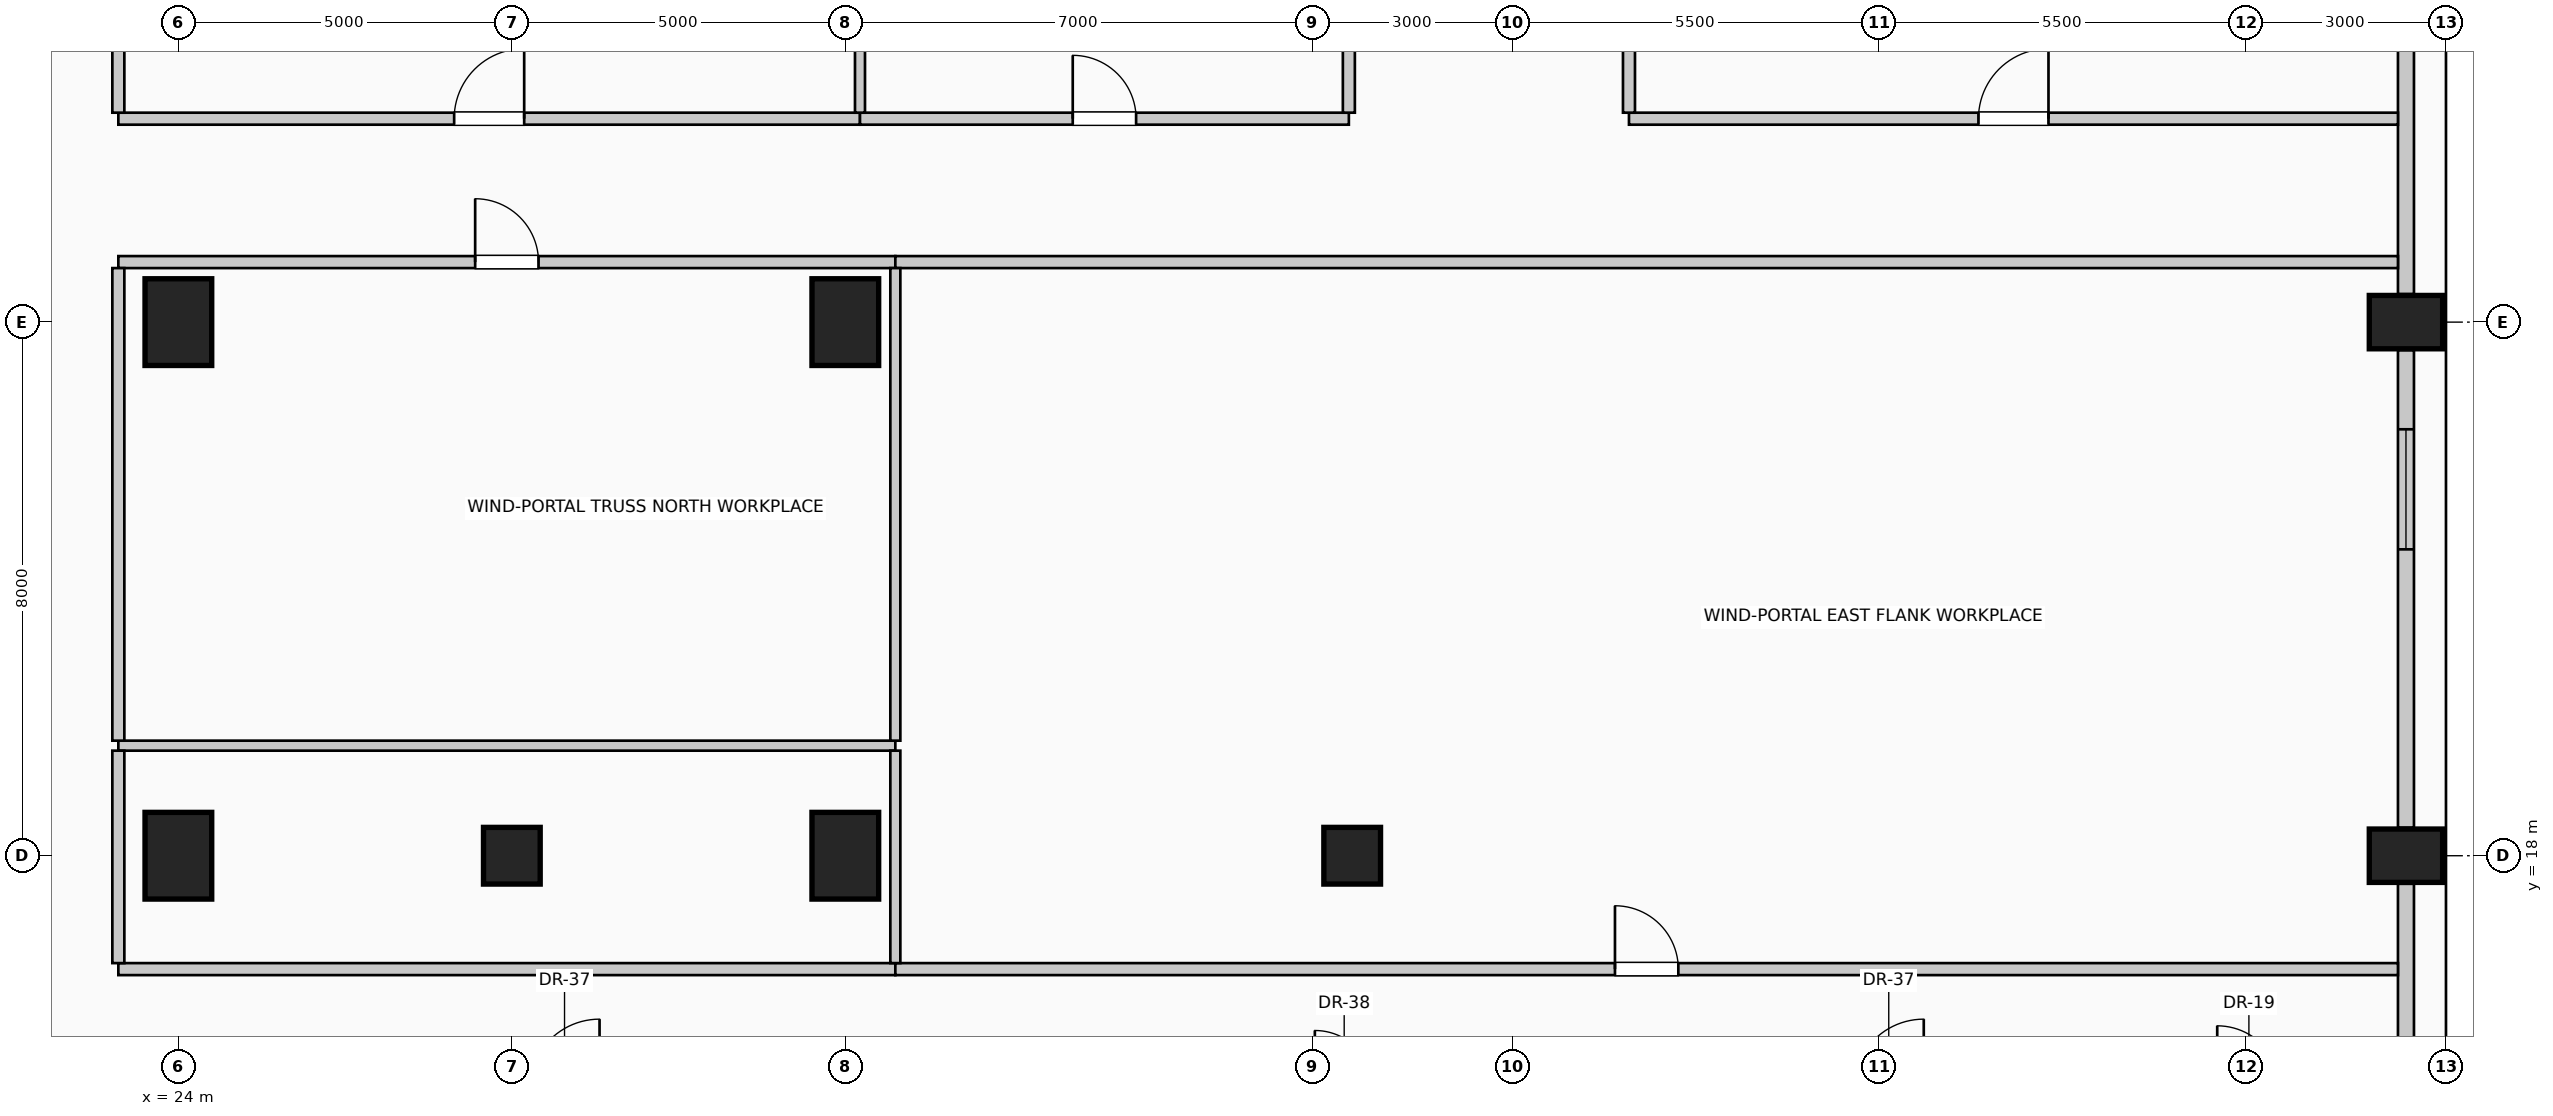
"""IFC4 building model, lengths in metres.
Left out: names, types, materials, properties, quantities, classifications, styles, units other than length and angle.
Written with IfcOpenShell. Run it as: python <this file> out.ifc"""

import sys

from ifc_helpers import new_model, si_unit, direction, frame, frame_2d, origin, origin_2d, place, context, subcontext, project, spatial, rectangle, circle, extrude, element, fill, save


model = new_model("IFC4")
c1 = context("Model", 3, precision=1e-05, world=origin(), true_north=direction((0.0, 1.0)))
c2 = subcontext(c1, "Body", "Model", "MODEL_VIEW")
j1 = project(units=[si_unit("LENGTHUNIT", "METRE"), si_unit("PLANEANGLEUNIT", "RADIAN")], contexts=[c1])
p1 = place(None, origin())
s1 = spatial("IfcSite", under=j1, at=p1, CompositionType="ELEMENT")
p2 = place(p1, origin())
s2 = spatial("IfcBuilding", under=s1, at=p2, CompositionType="ELEMENT")
p3 = place(p2, frame((0.0, 0.0, 206.6)))
s3 = spatial("IfcBuildingStorey", under=s2, at=p3, CompositionType="ELEMENT", Elevation=206.6)
for number, where, z_axis, x_axis in (
    (1, (57.4, 18.0, 0.0), (0.0, 0.0, 1.0), (0.0, 1.0, 0.0)),
    (2, (57.4, 26.0, 0.0), (0.0, 0.0, 1.0), (0.0, 1.0, 0.0)),
):
    element("IfcColumn", number, at=place(p3, frame(where, z_axis=z_axis, x_axis=x_axis)), inside=s3, PredefinedType="COLUMN", context=c2, shape_type="SweptSolid", body=[
        extrude(rectangle(XDim=0.8, YDim=1.1, at=origin_2d()), origin(), (0.0, 0.0, 1.0), 4.0),
    ])
for number, where, z_axis, x_axis in (
    (3, (24.0, 18.0, 0.0), (0.0, 0.0, 1.0), (1.0, 0.0, 0.0)),
    (4, (34.0, 18.0, 0.0), (0.0, 0.0, 1.0), (1.0, 0.0, 0.0)),
    (5, (24.0, 26.0, 0.0), (0.0, 0.0, 1.0), (1.0, 0.0, 0.0)),
    (6, (34.0, 26.0, 0.0), (0.0, 0.0, 1.0), (1.0, 0.0, 0.0)),
):
    element("IfcColumn", number, at=place(p3, frame(where, z_axis=z_axis, x_axis=x_axis)), inside=s3, PredefinedType="COLUMN", context=c2, shape_type="SweptSolid", body=[
        extrude(rectangle(XDim=1.0, YDim=1.3, at=origin_2d()), origin(), (0.0, 0.0, 1.0), 4.0),
    ])
for number, where, z_axis, x_axis in (
    (7, (29.0, 18.0, 0.0), (0.0, 0.0, 1.0), (1.0, 0.0, 0.0)),
    (8, (41.6, 18.0, 0.0), (0.0, 0.0, 1.0), (1.0, 0.0, 0.0)),
):
    element("IfcColumn", number, at=place(p3, frame(where, z_axis=z_axis, x_axis=x_axis)), inside=s3, PredefinedType="COLUMN", context=c2, shape_type="SweptSolid", body=[
        extrude(circle(Radius=0.425, at=origin_2d()), origin(), (0.0, 0.0, 1.0), 4.0),
    ])
p4 = place(p3, frame((57.4, 17.58, 0.0), z_axis=(0.0, 0.0, 1.0), x_axis=(0.0, -1.0, 0.0)))
e9 = element("IfcWall", 9, at=p4, inside=s3, PredefinedType="SOLIDWALL", context=c2, shape_type="SweptSolid", body=[
    extrude(rectangle(XDim=7.16, YDim=0.24, at=frame_2d((3.58, 0.0))), origin(), (0.0, 0.0, 1.0), 3.0),
])
p5 = place(p4, frame((4.173, 0.0, 0.42)))
e10 = element("IfcOpeningElement", 10, at=p5, cuts=e9, PredefinedType="OPENING", context=c2, shape_type="SweptSolid", body=[
    extrude(rectangle(XDim=1.8, YDim=2.2, at=frame_2d((0.9, 1.1))), frame((0.0, 0.13, 0.0), z_axis=(0.0, -1.0, 0.0), x_axis=(1.0, 0.0, 0.0)), (0.0, 0.0, 1.0), 0.26),
])
p6 = place(p3, frame((57.4, 25.58, 0.0), z_axis=(0.0, 0.0, 1.0), x_axis=(0.0, -1.0, 0.0)))
e11 = element("IfcWall", 11, at=p6, inside=s3, PredefinedType="SOLIDWALL", context=c2, shape_type="SweptSolid", body=[
    extrude(rectangle(XDim=7.16, YDim=0.24, at=frame_2d((3.58, 0.0))), origin(), (0.0, 0.0, 1.0), 3.0),
])
p7 = place(p6, frame((1.187, 0.0, 0.42)))
e12 = element("IfcOpeningElement", 12, at=p7, cuts=e11, PredefinedType="OPENING", context=c2, shape_type="SweptSolid", body=[
    extrude(rectangle(XDim=1.8, YDim=2.2, at=frame_2d((0.9, 1.1))), frame((0.0, 0.13, 0.0), z_axis=(0.0, -1.0, 0.0), x_axis=(1.0, 0.0, 0.0)), (0.0, 0.0, 1.0), 0.26),
])
p8 = place(p3, frame((57.4, 33.58, 0.0), z_axis=(0.0, 0.0, 1.0), x_axis=(0.0, -1.0, 0.0)))
e13 = element("IfcWall", 13, at=p8, inside=s3, PredefinedType="SOLIDWALL", context=c2, shape_type="SweptSolid", body=[
    extrude(rectangle(XDim=7.16, YDim=0.24, at=frame_2d((3.58, 0.0))), origin(), (0.0, 0.0, 1.0), 3.0),
])
p9 = place(p3, frame((23.1, 16.3, 0.0), z_axis=(0.0, 0.0, 1.0), x_axis=(1.0, 0.0, 0.0)))
e14 = element("IfcWall", 14, at=p9, inside=s3, PredefinedType="PARTITIONING", context=c2, shape_type="SweptSolid", body=[
    extrude(rectangle(XDim=11.65, YDim=0.18, at=frame_2d((5.825, 0.0))), origin(), (0.0, 0.0, 1.0), 3.75),
])
p10 = place(p3, frame((34.75, 16.3, 0.0), z_axis=(0.0, 0.0, 1.0), x_axis=(1.0, 0.0, 0.0)))
e15 = element("IfcWall", 15, at=p10, inside=s3, PredefinedType="PARTITIONING", context=c2, shape_type="SweptSolid", body=[
    extrude(rectangle(XDim=22.53, YDim=0.18, at=frame_2d((11.265, 0.0))), origin(), (0.0, 0.0, 1.0), 3.75),
])
p11 = place(p10, frame((10.79, 0.0, 0.0)))
e16 = element("IfcOpeningElement", 16, at=p11, cuts=e15, PredefinedType="OPENING", context=c2, shape_type="SweptSolid", body=[
    extrude(rectangle(XDim=0.95, YDim=2.15, at=frame_2d((0.475, 1.075))), frame((0.0, 0.1, 0.0), z_axis=(0.0, -1.0, 0.0), x_axis=(1.0, 0.0, 0.0)), (0.0, 0.0, 1.0), 0.2),
])
p12 = place(p3, frame((23.1, 19.65, 0.0), z_axis=(0.0, 0.0, 1.0), x_axis=(1.0, 0.0, 0.0)))
e17 = element("IfcWall", 17, at=p12, inside=s3, PredefinedType="PARTITIONING", context=c2, shape_type="SweptSolid", body=[
    extrude(rectangle(XDim=11.65, YDim=0.15, at=frame_2d((5.825, 0.0))), origin(), (0.0, 0.0, 1.0), 3.75),
])
p13 = place(p3, frame((23.1, 26.9, 0.0), z_axis=(0.0, 0.0, 1.0), x_axis=(1.0, 0.0, 0.0)))
e18 = element("IfcWall", 18, at=p13, inside=s3, PredefinedType="PARTITIONING", context=c2, shape_type="SweptSolid", body=[
    extrude(rectangle(XDim=11.65, YDim=0.18, at=frame_2d((5.825, 0.0))), origin(), (0.0, 0.0, 1.0), 3.75),
])
p14 = place(p13, frame((5.35, 0.0, 0.0)))
e19 = element("IfcOpeningElement", 19, at=p14, cuts=e18, PredefinedType="OPENING", context=c2, shape_type="SweptSolid", body=[
    extrude(rectangle(XDim=0.95, YDim=2.15, at=frame_2d((0.475, 1.075))), frame((0.0, 0.1, 0.0), z_axis=(0.0, -1.0, 0.0), x_axis=(1.0, 0.0, 0.0)), (0.0, 0.0, 1.0), 0.2),
])
p15 = place(p3, frame((34.75, 26.9, 0.0), z_axis=(0.0, 0.0, 1.0), x_axis=(1.0, 0.0, 0.0)))
e20 = element("IfcWall", 20, at=p15, inside=s3, PredefinedType="PARTITIONING", context=c2, shape_type="SweptSolid", body=[
    extrude(rectangle(XDim=22.53, YDim=0.18, at=frame_2d((11.265, 0.0))), origin(), (0.0, 0.0, 1.0), 3.75),
])
p16 = place(p3, frame((23.1, 29.05, 0.0), z_axis=(0.0, 0.0, 1.0), x_axis=(1.0, 0.0, 0.0)))
e21 = element("IfcWall", 21, at=p16, inside=s3, PredefinedType="PARTITIONING", context=c2, shape_type="SweptSolid", body=[
    extrude(rectangle(XDim=11.12, YDim=0.18, at=frame_2d((5.56, 0.0))), origin(), (0.0, 0.0, 1.0), 3.75),
])
p17 = place(p16, frame((5.035, 0.0, 0.0)))
e22 = element("IfcOpeningElement", 22, at=p17, cuts=e21, PredefinedType="OPENING", context=c2, shape_type="SweptSolid", body=[
    extrude(rectangle(XDim=1.05, YDim=2.15, at=frame_2d((0.525, 1.075))), frame((0.0, 0.1, 0.0), z_axis=(0.0, -1.0, 0.0), x_axis=(1.0, 0.0, 0.0)), (0.0, 0.0, 1.0), 0.2),
])
p18 = place(p3, frame((34.22, 29.05, 0.0), z_axis=(0.0, 0.0, 1.0), x_axis=(1.0, 0.0, 0.0)))
e23 = element("IfcWall", 23, at=p18, inside=s3, PredefinedType="PARTITIONING", context=c2, shape_type="SweptSolid", body=[
    extrude(rectangle(XDim=7.33, YDim=0.18, at=frame_2d((3.665, 0.0))), origin(), (0.0, 0.0, 1.0), 3.75),
])
p19 = place(p18, frame((3.19, 0.0, 0.0)))
e24 = element("IfcOpeningElement", 24, at=p19, cuts=e23, PredefinedType="OPENING", context=c2, shape_type="SweptSolid", body=[
    extrude(rectangle(XDim=0.95, YDim=2.15, at=frame_2d((0.475, 1.075))), frame((0.0, 0.1, 0.0), z_axis=(0.0, -1.0, 0.0), x_axis=(1.0, 0.0, 0.0)), (0.0, 0.0, 1.0), 0.2),
])
p20 = place(p3, frame((45.75, 29.05, 0.0), z_axis=(0.0, 0.0, 1.0), x_axis=(1.0, 0.0, 0.0)))
e25 = element("IfcWall", 25, at=p20, inside=s3, PredefinedType="PARTITIONING", context=c2, shape_type="SweptSolid", body=[
    extrude(rectangle(XDim=11.53, YDim=0.18, at=frame_2d((5.765, 0.0))), origin(), (0.0, 0.0, 1.0), 3.75),
])
p21 = place(p20, frame((5.24, 0.0, 0.0)))
e26 = element("IfcOpeningElement", 26, at=p21, cuts=e25, PredefinedType="OPENING", context=c2, shape_type="SweptSolid", body=[
    extrude(rectangle(XDim=1.05, YDim=2.15, at=frame_2d((0.525, 1.075))), frame((0.0, 0.1, 0.0), z_axis=(0.0, -1.0, 0.0), x_axis=(1.0, 0.0, 0.0)), (0.0, 0.0, 1.0), 0.2),
])
p22 = place(p3, frame((23.1, 16.39, 0.0), z_axis=(0.0, 0.0, 1.0), x_axis=(0.0, 1.0, 0.0)))
e27 = element("IfcWall", 27, at=p22, inside=s3, PredefinedType="PARTITIONING", context=c2, shape_type="SweptSolid", body=[
    extrude(rectangle(XDim=3.185, YDim=0.18, at=frame_2d((1.593, 0.0))), origin(), (0.0, 0.0, 1.0), 3.75),
])
p23 = place(p3, frame((23.1, 19.725, 0.0), z_axis=(0.0, 0.0, 1.0), x_axis=(0.0, 1.0, 0.0)))
e28 = element("IfcWall", 28, at=p23, inside=s3, PredefinedType="PARTITIONING", context=c2, shape_type="SweptSolid", body=[
    extrude(rectangle(XDim=7.085, YDim=0.18, at=frame_2d((3.542, 0.0))), origin(), (0.0, 0.0, 1.0), 3.75),
])
p24 = place(p3, frame((23.1, 29.14, 0.0), z_axis=(0.0, 0.0, 1.0), x_axis=(0.0, 1.0, 0.0)))
e29 = element("IfcWall", 29, at=p24, inside=s3, PredefinedType="PARTITIONING", context=c2, shape_type="SweptSolid", body=[
    extrude(rectangle(XDim=3.12, YDim=0.18, at=frame_2d((1.56, 0.0))), origin(), (0.0, 0.0, 1.0), 3.75),
])
p25 = place(p3, frame((34.22, 29.14, 0.0), z_axis=(0.0, 0.0, 1.0), x_axis=(0.0, 1.0, 0.0)))
e30 = element("IfcWall", 30, at=p25, inside=s3, PredefinedType="PARTITIONING", context=c2, shape_type="SweptSolid", body=[
    extrude(rectangle(XDim=4.21, YDim=0.15, at=frame_2d((2.105, 0.0))), origin(), (0.0, 0.0, 1.0), 3.145),
])
p26 = place(p3, frame((34.75, 16.39, 0.0), z_axis=(0.0, 0.0, 1.0), x_axis=(0.0, 1.0, 0.0)))
e31 = element("IfcWall", 31, at=p26, inside=s3, PredefinedType="PARTITIONING", context=c2, shape_type="SweptSolid", body=[
    extrude(rectangle(XDim=3.185, YDim=0.15, at=frame_2d((1.593, 0.0))), origin(), (0.0, 0.0, 1.0), 3.75),
])
p27 = place(p3, frame((34.75, 19.725, 0.0), z_axis=(0.0, 0.0, 1.0), x_axis=(0.0, 1.0, 0.0)))
e32 = element("IfcWall", 32, at=p27, inside=s3, PredefinedType="PARTITIONING", context=c2, shape_type="SweptSolid", body=[
    extrude(rectangle(XDim=7.085, YDim=0.15, at=frame_2d((3.542, 0.0))), origin(), (0.0, 0.0, 1.0), 3.75),
])
p28 = place(p3, frame((41.55, 29.14, 0.0), z_axis=(0.0, 0.0, 1.0), x_axis=(0.0, 1.0, 0.0)))
e33 = element("IfcWall", 33, at=p28, inside=s3, PredefinedType="PARTITIONING", context=c2, shape_type="SweptSolid", body=[
    extrude(rectangle(XDim=3.21, YDim=0.18, at=frame_2d((1.605, 0.0))), origin(), (0.0, 0.0, 1.0), 3.145),
])
p29 = place(p3, frame((45.75, 29.14, 0.0), z_axis=(0.0, 0.0, 1.0), x_axis=(0.0, 1.0, 0.0)))
e34 = element("IfcWall", 34, at=p29, inside=s3, PredefinedType="PARTITIONING", context=c2, shape_type="SweptSolid", body=[
    extrude(rectangle(XDim=3.135, YDim=0.18, at=frame_2d((1.567, 0.0))), origin(), (0.0, 0.0, 1.0), 3.75),
])
p30 = place(p7, origin())
e35 = element("IfcWindow", 35, at=p30, inside=s3, PartitioningType="SINGLE_PANEL", PredefinedType="WINDOW", context=c2, shape_type="SweptSolid", body=[
    extrude(rectangle(XDim=1.8, YDim=2.2, at=frame_2d((0.9, 1.1))), frame((0.0, 0.03, 0.0), z_axis=(0.0, -1.0, 0.0), x_axis=(1.0, 0.0, 0.0)), (0.0, 0.0, 1.0), 0.06),
])
fill(e12, e35)
p31 = place(p11, origin())
e36 = element("IfcDoor", 36, at=p31, inside=s3, OperationType="SINGLE_SWING_LEFT", PredefinedType="DOOR", context=c2, shape_type="SweptSolid", body=[
    extrude(rectangle(XDim=0.95, YDim=2.15, at=frame_2d((0.475, 1.075))), frame((0.0, 0.025, 0.0), z_axis=(0.0, -1.0, 0.0), x_axis=(1.0, 0.0, 0.0)), (0.0, 0.0, 1.0), 0.05),
])
fill(e16, e36)
p32 = place(p14, origin())
e37 = element("IfcDoor", 37, at=p32, inside=s3, OperationType="SINGLE_SWING_LEFT", PredefinedType="DOOR", context=c2, shape_type="SweptSolid", body=[
    extrude(rectangle(XDim=0.95, YDim=2.15, at=frame_2d((0.475, 1.075))), frame((0.0, 0.025, 0.0), z_axis=(0.0, -1.0, 0.0), x_axis=(1.0, 0.0, 0.0)), (0.0, 0.0, 1.0), 0.05),
])
fill(e19, e37)
p33 = place(p17, origin())
e38 = element("IfcDoor", 38, at=p33, inside=s3, OperationType="SINGLE_SWING_RIGHT", PredefinedType="DOOR", context=c2, shape_type="SweptSolid", body=[
    extrude(rectangle(XDim=1.05, YDim=2.15, at=frame_2d((0.525, 1.075))), frame((0.0, 0.025, 0.0), z_axis=(0.0, -1.0, 0.0), x_axis=(1.0, 0.0, 0.0)), (0.0, 0.0, 1.0), 0.05),
])
fill(e22, e38)
p34 = place(p19, origin())
e39 = element("IfcDoor", 39, at=p34, inside=s3, OperationType="SINGLE_SWING_LEFT", PredefinedType="DOOR", context=c2, shape_type="SweptSolid", body=[
    extrude(rectangle(XDim=0.95, YDim=2.15, at=frame_2d((0.475, 1.075))), frame((0.0, 0.025, 0.0), z_axis=(0.0, -1.0, 0.0), x_axis=(1.0, 0.0, 0.0)), (0.0, 0.0, 1.0), 0.05),
])
fill(e24, e39)
p35 = place(p21, origin())
e40 = element("IfcDoor", 40, at=p35, inside=s3, OperationType="SINGLE_SWING_RIGHT", PredefinedType="DOOR", context=c2, shape_type="SweptSolid", body=[
    extrude(rectangle(XDim=1.05, YDim=2.15, at=frame_2d((0.525, 1.075))), frame((0.0, 0.025, 0.0), z_axis=(0.0, -1.0, 0.0), x_axis=(1.0, 0.0, 0.0)), (0.0, 0.0, 1.0), 0.05),
])
fill(e26, e40)
save(model, sys.argv[1])
